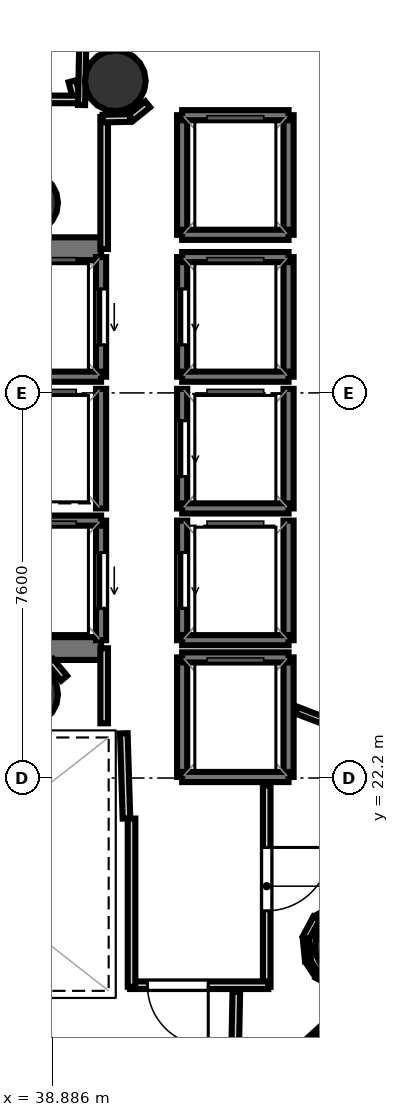
"""IFC4 building model, lengths in metres.
Left out: names, types, materials, properties, quantities, classifications, styles, units other than length and angle.
Written with IfcOpenShell. Run it as: python <this file> out.ifc"""

import sys

from ifc_helpers import new_model, si_unit, direction, frame, frame_2d, origin, origin_2d, place, context, subcontext, project, spatial, rectangle, hollow_circle, extrude, element, fill, save


model = new_model("IFC4")
c1 = context("Model", 3, precision=1e-05, world=origin(), true_north=direction((0.0, 1.0)))
c2 = subcontext(c1, "Body", "Model", "MODEL_VIEW")
j1 = project(units=[si_unit("LENGTHUNIT", "METRE"), si_unit("PLANEANGLEUNIT", "RADIAN")], contexts=[c1])
p1 = place(None, origin())
s1 = spatial("IfcSite", under=j1, at=p1, CompositionType="ELEMENT")
p2 = place(p1, origin())
s2 = spatial("IfcBuilding", under=s1, at=p2, CompositionType="ELEMENT")
p3 = place(p2, frame((0.0, 0.0, 222.5)))
s3 = spatial("IfcBuildingStorey", under=s2, at=p3, CompositionType="ELEMENT", Elevation=222.5)
p4 = place(p3, frame((29.33, 32.645, 0.0), z_axis=(0.0, 0.0, 1.0), x_axis=(1.0, 0.0, 0.0)))
e1 = element("IfcWall", 1, at=p4, inside=s3, PredefinedType="SHEAR", context=c2, shape_type="SweptSolid", body=[
    extrude(rectangle(XDim=10.52, YDim=0.45, at=frame_2d((5.26, 0.0))), origin(), (0.0, 0.0, 1.0), 3.52),
])
p5 = place(p4, frame((0.895, 0.0, 0.0)))
e2 = element("IfcOpeningElement", 2, at=p5, cuts=e1, PredefinedType="OPENING", context=c2, shape_type="SweptSolid", body=[
    extrude(rectangle(XDim=1.25, YDim=2.15, at=frame_2d((0.625, 1.075))), frame((0.0, 0.235, 0.0), z_axis=(0.0, -1.0, 0.0), x_axis=(1.0, 0.0, 0.0)), (0.0, 0.0, 1.0), 0.47),
])
p6 = place(p3, frame((29.33, 24.755, 0.0), z_axis=(0.0, 0.0, 1.0), x_axis=(1.0, 0.0, 0.0)))
e3 = element("IfcWall", 3, at=p6, inside=s3, PredefinedType="SHEAR", context=c2, shape_type="SweptSolid", body=[
    extrude(rectangle(XDim=10.52, YDim=0.45, at=frame_2d((5.26, 0.0))), origin(), (0.0, 0.0, 1.0), 3.52),
])
p7 = place(p6, frame((0.695, 0.0, 0.0)))
e4 = element("IfcOpeningElement", 4, at=p7, cuts=e3, PredefinedType="OPENING", context=c2, shape_type="SweptSolid", body=[
    extrude(rectangle(XDim=1.25, YDim=2.15, at=frame_2d((0.625, 1.075))), frame((0.0, 0.235, 0.0), z_axis=(0.0, -1.0, 0.0), x_axis=(1.0, 0.0, 0.0)), (0.0, 0.0, 1.0), 0.47),
])
for number, where, z_axis, x_axis in (
    (5, (38.4, 33.55, 0.0), (0.0, 0.0, 1.0), (1.0, 0.0, 0.0)),
    (6, (38.4, 23.85, 0.0), (0.0, 0.0, 1.0), (1.0, 0.0, 0.0)),
    (7, (40.131, 35.958, 0.0), (0.0, 0.0, 1.0), (1.0, 0.0, 0.0)),
    (8, (44.667, 18.883, 0.0), (0.0, 0.0, 1.0), (1.0, 0.0, 0.0)),
):
    element("IfcColumn", number, at=place(p3, frame(where, z_axis=z_axis, x_axis=x_axis)), inside=s3, PredefinedType="COLUMN", context=c2, shape_type="SweptSolid", body=[
        extrude(hollow_circle(Radius=0.6, WallThickness=0.03, at=origin_2d()), origin(), (0.0, 0.0, 1.0), 3.7),
    ])
p8 = place(p3, frame((39.85, 30.12, 0.0), z_axis=(0.0, 0.0, 1.0), x_axis=(0.0, 1.0, 0.0)))
e9 = element("IfcWall", 9, at=p8, inside=s3, PredefinedType="SOLIDWALL", context=c2, shape_type="SweptSolid", body=[
    extrude(rectangle(XDim=2.36, YDim=0.2, at=frame_2d((1.18, 0.0))), origin(), (0.0, 0.0, 1.0), 3.52),
])
p9 = place(p8, frame((0.63, 0.0, 0.0)))
e10 = element("IfcOpeningElement", 10, at=p9, cuts=e9, PredefinedType="OPENING", context=c2, shape_type="SweptSolid", body=[
    extrude(rectangle(XDim=1.1, YDim=2.15, at=frame_2d((0.55, 1.075))), frame((0.0, 0.11, 0.0), z_axis=(0.0, -1.0, 0.0), x_axis=(1.0, 0.0, 0.0)), (0.0, 0.0, 1.0), 0.22),
])
p10 = place(p3, frame((37.75, 30.12, 0.0), z_axis=(0.0, 0.0, 1.0), x_axis=(1.0, 0.0, 0.0)))
e11 = element("IfcWall", 11, at=p10, inside=s3, PredefinedType="SOLIDWALL", context=c2, shape_type="SweptSolid", body=[
    extrude(rectangle(XDim=2.1, YDim=0.2, at=frame_2d((1.05, 0.0))), origin(), (0.0, 0.0, 1.0), 3.52),
])
p11 = place(p3, frame((39.85, 24.92, 0.0), z_axis=(0.0, 0.0, 1.0), x_axis=(0.0, 1.0, 0.0)))
e12 = element("IfcWall", 12, at=p11, inside=s3, PredefinedType="SOLIDWALL", context=c2, shape_type="SweptSolid", body=[
    extrude(rectangle(XDim=2.36, YDim=0.2, at=frame_2d((1.18, 0.0))), origin(), (0.0, 0.0, 1.0), 3.52),
])
p12 = place(p11, frame((0.63, 0.0, 0.0)))
e13 = element("IfcOpeningElement", 13, at=p12, cuts=e12, PredefinedType="OPENING", context=c2, shape_type="SweptSolid", body=[
    extrude(rectangle(XDim=1.1, YDim=2.15, at=frame_2d((0.55, 1.075))), frame((0.0, 0.11, 0.0), z_axis=(0.0, -1.0, 0.0), x_axis=(1.0, 0.0, 0.0)), (0.0, 0.0, 1.0), 0.22),
])
p13 = place(p3, frame((37.75, 27.28, 0.0), z_axis=(0.0, 0.0, 1.0), x_axis=(1.0, 0.0, 0.0)))
e14 = element("IfcWall", 14, at=p13, inside=s3, PredefinedType="SOLIDWALL", context=c2, shape_type="SweptSolid", body=[
    extrude(rectangle(XDim=2.1, YDim=0.2, at=frame_2d((1.05, 0.0))), origin(), (0.0, 0.0, 1.0), 3.52),
])
p14 = place(p3, frame((43.55, 30.12, 0.0), z_axis=(0.0, 0.0, 1.0), x_axis=(0.0, 1.0, 0.0)))
e15 = element("IfcWall", 15, at=p14, inside=s3, PredefinedType="SOLIDWALL", context=c2, shape_type="SweptSolid", body=[
    extrude(rectangle(XDim=2.36, YDim=0.2, at=frame_2d((1.18, 0.0))), origin(), (0.0, 0.0, 1.0), 3.52),
])
p15 = place(p3, frame((41.45, 30.12, 0.0), z_axis=(0.0, 0.0, 1.0), x_axis=(0.0, 1.0, 0.0)))
e16 = element("IfcWall", 16, at=p15, inside=s3, PredefinedType="SOLIDWALL", context=c2, shape_type="SweptSolid", body=[
    extrude(rectangle(XDim=2.36, YDim=0.2, at=frame_2d((1.18, 0.0))), origin(), (0.0, 0.0, 1.0), 3.52),
])
p16 = place(p15, frame((0.63, 0.0, 0.0)))
e17 = element("IfcOpeningElement", 17, at=p16, cuts=e16, PredefinedType="OPENING", context=c2, shape_type="SweptSolid", body=[
    extrude(rectangle(XDim=1.1, YDim=2.15, at=frame_2d((0.55, 1.075))), frame((0.0, 0.11, 0.0), z_axis=(0.0, -1.0, 0.0), x_axis=(1.0, 0.0, 0.0)), (0.0, 0.0, 1.0), 0.22),
])
for number, where, z_axis, x_axis in (
    (18, (41.45, 32.48, 0.0), (0.0, 0.0, 1.0), (1.0, 0.0, 0.0)),
    (19, (41.45, 30.12, 0.0), (0.0, 0.0, 1.0), (1.0, 0.0, 0.0)),
):
    element("IfcWall", number, at=place(p3, frame(where, z_axis=z_axis, x_axis=x_axis)), inside=s3, PredefinedType="SOLIDWALL", context=c2, shape_type="SweptSolid", body=[
        extrude(rectangle(XDim=2.1, YDim=0.2, at=frame_2d((1.05, 0.0))), origin(), (0.0, 0.0, 1.0), 3.52),
    ])
p17 = place(p3, frame((43.55, 27.52, 0.0), z_axis=(0.0, 0.0, 1.0), x_axis=(0.0, 1.0, 0.0)))
e20 = element("IfcWall", 20, at=p17, inside=s3, PredefinedType="SOLIDWALL", context=c2, shape_type="SweptSolid", body=[
    extrude(rectangle(XDim=2.36, YDim=0.2, at=frame_2d((1.18, 0.0))), origin(), (0.0, 0.0, 1.0), 3.52),
])
p18 = place(p3, frame((41.45, 27.52, 0.0), z_axis=(0.0, 0.0, 1.0), x_axis=(0.0, 1.0, 0.0)))
e21 = element("IfcWall", 21, at=p18, inside=s3, PredefinedType="SOLIDWALL", context=c2, shape_type="SweptSolid", body=[
    extrude(rectangle(XDim=2.36, YDim=0.2, at=frame_2d((1.18, 0.0))), origin(), (0.0, 0.0, 1.0), 3.52),
])
p19 = place(p18, frame((0.63, 0.0, 0.0)))
e22 = element("IfcOpeningElement", 22, at=p19, cuts=e21, PredefinedType="OPENING", context=c2, shape_type="SweptSolid", body=[
    extrude(rectangle(XDim=1.1, YDim=2.15, at=frame_2d((0.55, 1.075))), frame((0.0, 0.11, 0.0), z_axis=(0.0, -1.0, 0.0), x_axis=(1.0, 0.0, 0.0)), (0.0, 0.0, 1.0), 0.22),
])
p20 = place(p3, frame((41.45, 27.52, 0.0), z_axis=(0.0, 0.0, 1.0), x_axis=(1.0, 0.0, 0.0)))
e23 = element("IfcWall", 23, at=p20, inside=s3, PredefinedType="SOLIDWALL", context=c2, shape_type="SweptSolid", body=[
    extrude(rectangle(XDim=2.1, YDim=0.2, at=frame_2d((1.05, 0.0))), origin(), (0.0, 0.0, 1.0), 3.52),
])
p21 = place(p3, frame((43.55, 24.92, 0.0), z_axis=(0.0, 0.0, 1.0), x_axis=(0.0, 1.0, 0.0)))
e24 = element("IfcWall", 24, at=p21, inside=s3, PredefinedType="SOLIDWALL", context=c2, shape_type="SweptSolid", body=[
    extrude(rectangle(XDim=2.36, YDim=0.2, at=frame_2d((1.18, 0.0))), origin(), (0.0, 0.0, 1.0), 3.52),
])
p22 = place(p3, frame((41.45, 24.92, 0.0), z_axis=(0.0, 0.0, 1.0), x_axis=(0.0, 1.0, 0.0)))
e25 = element("IfcWall", 25, at=p22, inside=s3, PredefinedType="SOLIDWALL", context=c2, shape_type="SweptSolid", body=[
    extrude(rectangle(XDim=2.36, YDim=0.2, at=frame_2d((1.18, 0.0))), origin(), (0.0, 0.0, 1.0), 3.52),
])
p23 = place(p22, frame((0.63, 0.0, 0.0)))
e26 = element("IfcOpeningElement", 26, at=p23, cuts=e25, PredefinedType="OPENING", context=c2, shape_type="SweptSolid", body=[
    extrude(rectangle(XDim=1.1, YDim=2.15, at=frame_2d((0.55, 1.075))), frame((0.0, 0.11, 0.0), z_axis=(0.0, -1.0, 0.0), x_axis=(1.0, 0.0, 0.0)), (0.0, 0.0, 1.0), 0.22),
])
p24 = place(p3, frame((41.45, 24.92, 0.0), z_axis=(0.0, 0.0, 1.0), x_axis=(1.0, 0.0, 0.0)))
e27 = element("IfcWall", 27, at=p24, inside=s3, PredefinedType="SOLIDWALL", context=c2, shape_type="SweptSolid", body=[
    extrude(rectangle(XDim=2.1, YDim=0.2, at=frame_2d((1.05, 0.0))), origin(), (0.0, 0.0, 1.0), 3.52),
])
p25 = place(p3, frame((39.85, 27.52, 0.0), z_axis=(0.0, 0.0, 1.0), x_axis=(0.0, 1.0, 0.0)))
e28 = element("IfcWall", 28, at=p25, inside=s3, PredefinedType="SOLIDWALL", context=c2, shape_type="SweptSolid", body=[
    extrude(rectangle(XDim=2.36, YDim=0.2, at=frame_2d((1.18, 0.0))), origin(), (0.0, 0.0, 1.0), 3.52),
])
for number, where, z_axis, x_axis in (
    (29, (43.55, 22.22, 0.0), (0.0, 0.0, 1.0), (0.0, 1.0, 0.0)),
    (30, (41.45, 22.22, 0.0), (0.0, 0.0, 1.0), (0.0, 1.0, 0.0)),
):
    element("IfcWall", number, at=place(p3, frame(where, z_axis=z_axis, x_axis=x_axis)), inside=s3, PredefinedType="SOLIDWALL", context=c2, shape_type="SweptSolid", body=[
        extrude(rectangle(XDim=2.36, YDim=0.2, at=frame_2d((1.18, 0.0))), origin(), (0.0, 0.0, 1.0), 3.52),
    ])
for number, where, z_axis, x_axis in (
    (31, (41.45, 24.58, 0.0), (0.0, 0.0, 1.0), (1.0, 0.0, 0.0)),
    (32, (41.45, 22.22, 0.0), (0.0, 0.0, 1.0), (1.0, 0.0, 0.0)),
):
    element("IfcWall", number, at=place(p3, frame(where, z_axis=z_axis, x_axis=x_axis)), inside=s3, PredefinedType="SOLIDWALL", context=c2, shape_type="SweptSolid", body=[
        extrude(rectangle(XDim=2.1, YDim=0.2, at=frame_2d((1.05, 0.0))), origin(), (0.0, 0.0, 1.0), 3.52),
    ])
for number, where, z_axis, x_axis in (
    (33, (43.55, 32.92, 0.0), (0.0, 0.0, 1.0), (0.0, 1.0, 0.0)),
    (34, (41.45, 32.92, 0.0), (0.0, 0.0, 1.0), (0.0, 1.0, 0.0)),
):
    element("IfcWall", number, at=place(p3, frame(where, z_axis=z_axis, x_axis=x_axis)), inside=s3, PredefinedType="SOLIDWALL", context=c2, shape_type="SweptSolid", body=[
        extrude(rectangle(XDim=2.36, YDim=0.2, at=frame_2d((1.18, 0.0))), origin(), (0.0, 0.0, 1.0), 3.52),
    ])
for number, where, z_axis, x_axis in (
    (35, (41.45, 35.28, 0.0), (0.0, 0.0, 1.0), (1.0, 0.0, 0.0)),
    (36, (41.45, 32.92, 0.0), (0.0, 0.0, 1.0), (1.0, 0.0, 0.0)),
):
    element("IfcWall", number, at=place(p3, frame(where, z_axis=z_axis, x_axis=x_axis)), inside=s3, PredefinedType="SOLIDWALL", context=c2, shape_type="SweptSolid", body=[
        extrude(rectangle(XDim=2.1, YDim=0.2, at=frame_2d((1.05, 0.0))), origin(), (0.0, 0.0, 1.0), 3.52),
    ])
p26 = place(p3, frame((40.351, 21.401, 0.0), z_axis=(0.0, 0.0, 1.0), x_axis=(-0.031058045979, 0.999517582527, 0.0)))
e37 = element("IfcWall", 37, at=p26, inside=s3, PredefinedType="PARTITIONING", context=c2, shape_type="SweptSolid", body=[
    extrude(rectangle(XDim=1.682, YDim=0.15, at=frame_2d((0.841, 0.0))), origin(), (0.0, 0.0, 1.0), 2.84),
])
p27 = place(p3, frame((39.911, 23.28, 0.0), z_axis=(0.0, 0.0, 1.0), x_axis=(0.0, 1.0, 0.0)))
e38 = element("IfcWall", 38, at=p27, inside=s3, PredefinedType="PARTITIONING", context=c2, shape_type="SweptSolid", body=[
    extrude(rectangle(XDim=1.48, YDim=0.15, at=frame_2d((0.74, 0.0))), origin(), (0.0, 0.0, 1.0), 2.84),
])
p28 = place(p3, frame((39.911, 32.64, 0.0), z_axis=(0.0, 0.0, 1.0), x_axis=(0.0, 1.0, 0.0)))
e39 = element("IfcWall", 39, at=p28, inside=s3, PredefinedType="PARTITIONING", context=c2, shape_type="SweptSolid", body=[
    extrude(rectangle(XDim=2.604, YDim=0.15, at=frame_2d((1.302, 0.0))), origin(), (0.0, 0.0, 1.0), 2.84),
])
p29 = place(p3, frame((39.881, 35.213, 0.0), z_axis=(0.0, 0.0, 1.0), x_axis=(0.999756500784, 0.02206669754, 0.0)))
e40 = element("IfcWall", 40, at=p29, inside=s3, PredefinedType="PARTITIONING", context=c2, shape_type="SweptSolid", body=[
    extrude(rectangle(XDim=0.542, YDim=0.15, at=frame_2d((0.271, 0.0))), origin(), (0.0, 0.0, 1.0), 2.84),
])
p30 = place(p3, frame((40.441, 35.232, 0.0), z_axis=(0.0, 0.0, 1.0), x_axis=(0.778714564707, 0.627378376033, 0.0)))
e41 = element("IfcWall", 41, at=p30, inside=s3, PredefinedType="PARTITIONING", context=c2, shape_type="SweptSolid", body=[
    extrude(rectangle(XDim=0.421, YDim=0.15, at=frame_2d((0.21, 0.0))), origin(), (0.0, 0.0, 1.0), 2.84),
])
p31 = place(p3, frame((43.119, 22.05, 0.0), z_axis=(0.0, 0.0, 1.0), x_axis=(0.0, -1.0, 0.0)))
e42 = element("IfcWall", 42, at=p31, inside=s3, PredefinedType="PARTITIONING", context=c2, shape_type="SweptSolid", body=[
    extrude(rectangle(XDim=3.97, YDim=0.15, at=frame_2d((1.985, 0.0))), origin(), (0.0, 0.0, 1.0), 2.84),
])
p32 = place(p31, frame((1.22, 0.0, 0.0)))
e43 = element("IfcOpeningElement", 43, at=p32, cuts=e42, PredefinedType="OPENING", context=c2, shape_type="SweptSolid", body=[
    extrude(rectangle(XDim=1.25, YDim=2.2, at=frame_2d((0.625, 1.1))), frame((0.0, 0.085, 0.0), z_axis=(0.0, -1.0, 0.0), x_axis=(1.0, 0.0, 0.0)), (0.0, 0.0, 1.0), 0.17),
])
p33 = place(p3, frame((43.15, 18.111, 0.0), z_axis=(0.0, 0.0, 1.0), x_axis=(-1.0, 0.0, 0.0)))
e44 = element("IfcWall", 44, at=p33, inside=s3, PredefinedType="PARTITIONING", context=c2, shape_type="SweptSolid", body=[
    extrude(rectangle(XDim=2.73, YDim=0.15, at=frame_2d((1.365, 0.0))), origin(), (0.0, 0.0, 1.0), 2.84),
])
p34 = place(p33, frame((1.185, 0.0, 0.0)))
e45 = element("IfcOpeningElement", 45, at=p34, cuts=e44, PredefinedType="OPENING", context=c2, shape_type="SweptSolid", body=[
    extrude(rectangle(XDim=1.2, YDim=2.15, at=frame_2d((0.6, 1.075))), frame((0.0, 0.085, 0.0), z_axis=(0.0, -1.0, 0.0), x_axis=(1.0, 0.0, 0.0)), (0.0, 0.0, 1.0), 0.17),
])
p35 = place(p3, frame((40.451, 18.08, 0.0), z_axis=(0.0, 0.0, 1.0), x_axis=(0.0, 1.0, 0.0)))
e46 = element("IfcWall", 46, at=p35, inside=s3, PredefinedType="PARTITIONING", context=c2, shape_type="SweptSolid", body=[
    extrude(rectangle(XDim=3.32, YDim=0.15, at=frame_2d((1.66, 0.0))), origin(), (0.0, 0.0, 1.0), 2.84),
])
p36 = place(p3, frame((39.121, 24.17, 0.0), z_axis=(0.0, 0.0, 1.0), x_axis=(-0.638008265708, 0.770029514296, 0.0)))
e47 = element("IfcWall", 47, at=p36, inside=s3, PredefinedType="PARTITIONING", context=c2, shape_type="SweptSolid", body=[
    extrude(rectangle(XDim=0.431, YDim=0.15, at=frame_2d((0.215, 0.0))), origin(), (0.0, 0.0, 1.0), 2.84),
])
p37 = place(p3, frame((39.281, 35.95, 0.0), z_axis=(0.0, 0.0, 1.0), x_axis=(0.260610646634, -0.965443986392, 0.0)))
e48 = element("IfcWall", 48, at=p37, inside=s3, PredefinedType="PARTITIONING", context=c2, shape_type="SweptSolid", body=[
    extrude(rectangle(XDim=0.412, YDim=0.15, at=frame_2d((0.206, 0.0))), origin(), (0.0, 0.0, 1.0), 2.84),
])
p38 = place(p3, frame((39.418, 35.591, 0.0), z_axis=(0.0, 0.0, 1.0), x_axis=(-0.999997505315, 0.002233688461, 0.0)))
e49 = element("IfcWall", 49, at=p38, inside=s3, PredefinedType="PARTITIONING", context=c2, shape_type="SweptSolid", body=[
    extrude(rectangle(XDim=4.918, YDim=0.15, at=frame_2d((2.459, 0.0))), origin(), (0.0, 0.0, 1.0), 2.84),
])
p39 = place(p38, frame((2.814, 0.0, 0.0)))
e50 = element("IfcOpeningElement", 50, at=p39, cuts=e49, PredefinedType="OPENING", context=c2, shape_type="SweptSolid", body=[
    extrude(rectangle(XDim=1.25, YDim=2.2, at=frame_2d((0.625, 1.1))), frame((0.0, 0.085, 0.0), z_axis=(0.0, -1.0, 0.0), x_axis=(1.0, 0.0, 0.0)), (0.0, 0.0, 1.0), 0.17),
])
p40 = place(p3, frame((42.519, 17.981, 0.0), z_axis=(0.0, 0.0, 1.0), x_axis=(-0.019860499427, -0.99980276083, 0.0)))
e51 = element("IfcWall", 51, at=p40, inside=s3, PredefinedType="PARTITIONING", context=c2, shape_type="SweptSolid", body=[
    extrude(rectangle(XDim=3.098, YDim=0.15, at=frame_2d((1.549, 0.0))), origin(), (0.0, 0.0, 1.0), 2.84),
])
p41 = place(p3, frame((43.709, 23.538, 0.0), z_axis=(0.0, 0.0, 1.0), x_axis=(0.93358484642, -0.35835643504, 0.0)))
e52 = element("IfcWall", 52, at=p41, inside=s3, PredefinedType="PARTITIONING", context=c2, shape_type="SweptSolid", body=[
    extrude(rectangle(XDim=6.202, YDim=0.14, at=frame_2d((3.101, 0.0))), origin(), (0.0, 0.0, 1.0), 2.84),
])
p42 = place(p3, frame((44.504, 19.656, 0.0), z_axis=(0.0, 0.0, 1.0), x_axis=(-0.881923737177, -0.471392110461, 0.0)))
e53 = element("IfcWall", 53, at=p42, inside=s3, PredefinedType="PARTITIONING", context=c2, shape_type="SweptSolid", body=[
    extrude(rectangle(XDim=0.441, YDim=0.105, at=frame_2d((0.221, 0.0))), origin(), (0.0, 0.0, 1.0), 2.84),
])
p43 = place(p3, frame((44.102, 19.435, 0.0), z_axis=(0.0, 0.0, 1.0), x_axis=(-0.471392110461, -0.881923737177, 0.0)))
e54 = element("IfcWall", 54, at=p43, inside=s3, PredefinedType="PARTITIONING", context=c2, shape_type="SweptSolid", body=[
    extrude(rectangle(XDim=0.441, YDim=0.14, at=frame_2d((0.221, 0.0))), origin(), (0.0, 0.0, 1.0), 2.84),
])
p44 = place(p3, frame((43.891, 19.028, 0.0), z_axis=(0.0, 0.0, 1.0), x_axis=(0.097915215421, -0.995194760129, 0.0)))
e55 = element("IfcWall", 55, at=p44, inside=s3, PredefinedType="PARTITIONING", context=c2, shape_type="SweptSolid", body=[
    extrude(rectangle(XDim=0.441, YDim=0.12, at=frame_2d((0.221, 0.0))), origin(), (0.0, 0.0, 1.0), 2.84),
])
p45 = place(p3, frame((43.939, 18.575, 0.0), z_axis=(0.0, 0.0, 1.0), x_axis=(0.55508024351, -0.831796804072, 0.0)))
e56 = element("IfcWall", 56, at=p45, inside=s3, PredefinedType="PARTITIONING", context=c2, shape_type="SweptSolid", body=[
    extrude(rectangle(XDim=0.296, YDim=0.105, at=frame_2d((0.148, 0.0))), origin(), (0.0, 0.0, 1.0), 2.84),
])
p46 = place(p3, frame((44.115, 18.318, 0.0), z_axis=(0.0, 0.0, 1.0), x_axis=(0.881913089805, -0.471412030002, 0.0)))
e57 = element("IfcWall", 57, at=p46, inside=s3, PredefinedType="PARTITIONING", context=c2, shape_type="SweptSolid", body=[
    extrude(rectangle(XDim=1.507, YDim=0.14, at=frame_2d((0.753, 0.0))), origin(), (0.0, 0.0, 1.0), 2.84),
])
p47 = place(p3, frame((45.191, 18.149, 0.0), z_axis=(0.0, 0.0, 1.0), x_axis=(-0.738077461562, -0.674715985237, 0.0)))
e58 = element("IfcWall", 58, at=p47, inside=s3, PredefinedType="PARTITIONING", context=c2, shape_type="SweptSolid", body=[
    extrude(rectangle(XDim=3.499, YDim=0.12, at=frame_2d((1.749, 0.0))), origin(), (0.0, 0.0, 1.0), 2.84),
])
p48 = place(p3, frame((39.465, 35.481, 0.0), z_axis=(0.0, 0.0, 1.0), x_axis=(0.019922431781, 0.999801528661, 0.0)))
e59 = element("IfcWall", 59, at=p48, inside=s3, PredefinedType="PARTITIONING", context=c2, shape_type="SweptSolid", body=[
    extrude(rectangle(XDim=1.924, YDim=0.14, at=frame_2d((0.962, 0.0))), origin(), (0.0, 0.0, 1.0), 2.84),
])
p49 = place(p9, origin())
e60 = element("IfcDoor", 60, at=p49, inside=s3, OperationType="SLIDING_TO_LEFT", PredefinedType="DOOR", context=c2, shape_type="SweptSolid", body=[
    extrude(rectangle(XDim=1.1, YDim=2.15, at=frame_2d((0.55, 1.075))), frame((0.0, 0.025, 0.0), z_axis=(0.0, -1.0, 0.0), x_axis=(1.0, 0.0, 0.0)), (0.0, 0.0, 1.0), 0.05),
])
fill(e10, e60)
p50 = place(p12, origin())
e61 = element("IfcDoor", 61, at=p50, inside=s3, OperationType="SLIDING_TO_LEFT", PredefinedType="DOOR", context=c2, shape_type="SweptSolid", body=[
    extrude(rectangle(XDim=1.1, YDim=2.15, at=frame_2d((0.55, 1.075))), frame((0.0, 0.025, 0.0), z_axis=(0.0, -1.0, 0.0), x_axis=(1.0, 0.0, 0.0)), (0.0, 0.0, 1.0), 0.05),
])
fill(e13, e61)
p51 = place(p16, origin())
e62 = element("IfcDoor", 62, at=p51, inside=s3, OperationType="SLIDING_TO_LEFT", PredefinedType="DOOR", context=c2, shape_type="SweptSolid", body=[
    extrude(rectangle(XDim=1.1, YDim=2.15, at=frame_2d((0.55, 1.075))), frame((0.0, 0.025, 0.0), z_axis=(0.0, -1.0, 0.0), x_axis=(1.0, 0.0, 0.0)), (0.0, 0.0, 1.0), 0.05),
])
fill(e17, e62)
p52 = place(p19, origin())
e63 = element("IfcDoor", 63, at=p52, inside=s3, OperationType="SLIDING_TO_LEFT", PredefinedType="DOOR", context=c2, shape_type="SweptSolid", body=[
    extrude(rectangle(XDim=1.1, YDim=2.15, at=frame_2d((0.55, 1.075))), frame((0.0, 0.025, 0.0), z_axis=(0.0, -1.0, 0.0), x_axis=(1.0, 0.0, 0.0)), (0.0, 0.0, 1.0), 0.05),
])
fill(e22, e63)
p53 = place(p23, origin())
e64 = element("IfcDoor", 64, at=p53, inside=s3, OperationType="SLIDING_TO_LEFT", PredefinedType="DOOR", context=c2, shape_type="SweptSolid", body=[
    extrude(rectangle(XDim=1.1, YDim=2.15, at=frame_2d((0.55, 1.075))), frame((0.0, 0.025, 0.0), z_axis=(0.0, -1.0, 0.0), x_axis=(1.0, 0.0, 0.0)), (0.0, 0.0, 1.0), 0.05),
])
fill(e26, e64)
p54 = place(p34, origin())
e65 = element("IfcDoor", 65, at=p54, inside=s3, OperationType="SINGLE_SWING_LEFT", PredefinedType="DOOR", context=c2, shape_type="SweptSolid", body=[
    extrude(rectangle(XDim=1.2, YDim=2.15, at=frame_2d((0.6, 1.075))), frame((0.0, 0.025, 0.0), z_axis=(0.0, -1.0, 0.0), x_axis=(1.0, 0.0, 0.0)), (0.0, 0.0, 1.0), 0.05),
])
fill(e45, e65)
p55 = place(p32, origin())
e66 = element("IfcDoor", 66, at=p55, inside=s3, OperationType="SINGLE_SWING_LEFT", PredefinedType="DOOR", context=c2, shape_type="SweptSolid", body=[
    extrude(rectangle(XDim=1.25, YDim=2.2, at=frame_2d((0.625, 1.1))), frame((0.0, 0.025, 0.0), z_axis=(0.0, -1.0, 0.0), x_axis=(1.0, 0.0, 0.0)), (0.0, 0.0, 1.0), 0.05),
])
fill(e43, e66)
save(model, sys.argv[1])
